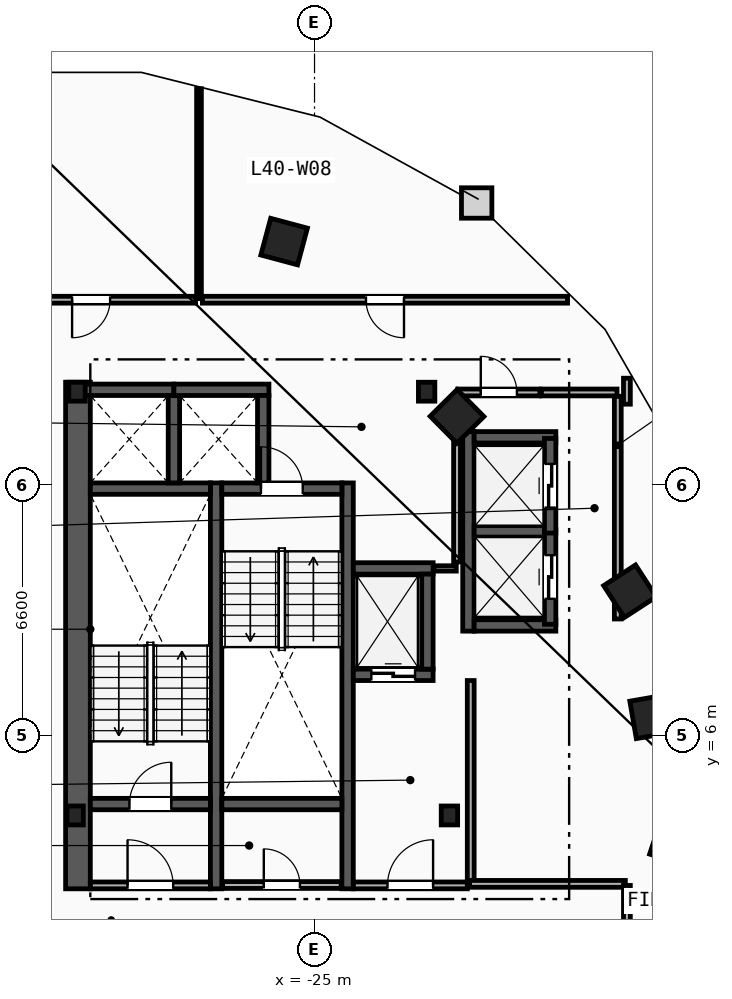
"""IFC4 building model, lengths in metres.
Left out: names, types, materials, properties, quantities, classifications, styles, units other than length and angle.
Written with IfcOpenShell. Run it as: python <this file> out.ifc"""

import sys

from ifc_helpers import new_model, si_unit, direction, frame, frame_2d, origin, origin_2d, place, context, subcontext, project, spatial, rectangle, i_section, extrude, element, fill, save


model = new_model("IFC4")
c1 = context("Model", 3, precision=1e-05, world=origin(), true_north=direction((0.0, 1.0)))
c2 = subcontext(c1, "Body", "Model", "MODEL_VIEW")
j1 = project(units=[si_unit("LENGTHUNIT", "METRE"), si_unit("PLANEANGLEUNIT", "RADIAN")], contexts=[c1])
p1 = place(None, origin())
s1 = spatial("IfcSite", under=j1, at=p1, CompositionType="ELEMENT")
p2 = place(p1, origin())
s2 = spatial("IfcBuilding", under=s1, at=p2, CompositionType="ELEMENT")
p3 = place(p2, frame((0.0, 0.0, 154.8)))
s3 = spatial("IfcBuildingStorey", under=s2, at=p3, CompositionType="ELEMENT", Elevation=154.8)
for number, where, z_axis, x_axis in (
    (1, (-31.3, 3.9, 0.0), (0.0, 0.0, 1.0), (1.0, 0.0, 0.0)),
    (2, (-21.45, 3.9, 0.0), (0.0, 0.0, 1.0), (1.0, 0.0, 0.0)),
    (3, (-22.05, 15.05, 0.0), (0.0, 0.0, 1.0), (1.0, 0.0, 0.0)),
    (4, (-31.25, 15.05, 0.0), (0.0, 0.0, 1.0), (1.0, 0.0, 0.0)),
):
    element("IfcColumn", number, at=place(p3, frame(where, z_axis=z_axis, x_axis=x_axis)), inside=s3, PredefinedType="COLUMN", context=c2, shape_type="SweptSolid", body=[
        extrude(i_section(OverallWidth=0.432, OverallDepth=0.498, WebThickness=0.056, FlangeThickness=0.089, FilletRadius=0.018, at=origin_2d()), origin(), (0.0, 0.0, 1.0), 3.6),
    ])
for number, where, z_axis, x_axis in (
    (5, (-15.55, 3.2, 0.0), (0.0, 0.0, 1.0), (0.315, 0.949, 0.0)),
    (6, (-16.125, 6.5, 0.0), (0.0, 0.0, 1.0), (-0.172, 0.985, 0.0)),
    (7, (-16.7, 9.8, 0.0), (0.0, 0.0, 1.0), (-0.544, 0.839, 0.0)),
    (8, (-21.25, 14.4, 0.0), (0.0, 0.0, 1.0), (-0.703, 0.711, 0.0)),
    (9, (-25.8, 19.0, 0.0), (0.0, 0.0, 1.0), (-0.966, 0.259, 0.0)),
):
    element("IfcColumn", number, at=place(p3, frame(where, z_axis=z_axis, x_axis=x_axis)), inside=s3, PredefinedType="COLUMN", context=c2, shape_type="SweptSolid", body=[
        extrude(rectangle(XDim=1.0, YDim=1.0, at=origin_2d()), origin(), (0.0, 0.0, 1.0), 3.6),
    ])
p4 = place(p3, frame((-31.225, 1.97, 0.0), z_axis=(0.0, 0.0, 1.0), x_axis=(0.0, 1.0, 0.0)))
e10 = element("IfcWall", 10, at=p4, inside=s3, PredefinedType="SHEAR", context=c2, shape_type="SweptSolid", body=[
    extrude(rectangle(XDim=13.33, YDim=0.65, at=frame_2d((6.665, 0.0))), origin(), (0.0, 0.0, 1.0), 3.36),
])
for number, where, z_axis, x_axis in (
    (11, (-27.59, 1.97, 0.0), (0.0, 0.0, 1.0), (0.0, 1.0, 0.0)),
    (12, (-24.13, 1.97, 0.0), (0.0, 0.0, 1.0), (0.0, 1.0, 0.0)),
):
    element("IfcWall", number, at=place(p3, frame(where, z_axis=z_axis, x_axis=x_axis)), inside=s3, PredefinedType="SHEAR", context=c2, shape_type="SweptSolid", body=[
        extrude(rectangle(XDim=10.68, YDim=0.3, at=frame_2d((5.34, 0.0))), origin(), (0.0, 0.0, 1.0), 3.36),
    ])
p5 = place(p3, frame((-30.9, 4.2, 0.0), z_axis=(0.0, 0.0, 1.0), x_axis=(1.0, 0.0, 0.0)))
e13 = element("IfcWall", 13, at=p5, inside=s3, PredefinedType="SHEAR", context=c2, shape_type="SweptSolid", body=[
    extrude(rectangle(XDim=3.16, YDim=0.3, at=frame_2d((1.58, 0.0))), origin(), (0.0, 0.0, 1.0), 3.36),
])
p6 = place(p5, frame((1.03, 0.0, 0.0)))
e14 = element("IfcOpeningElement", 14, at=p6, cuts=e13, PredefinedType="OPENING", context=c2, shape_type="SweptSolid", body=[
    extrude(rectangle(XDim=1.1, YDim=2.15, at=frame_2d((0.55, 1.075))), frame((0.0, 0.16, 0.0), z_axis=(0.0, -1.0, 0.0), x_axis=(1.0, 0.0, 0.0)), (0.0, 0.0, 1.0), 0.32),
])
p7 = place(p3, frame((-30.9, 12.5, 0.0), z_axis=(0.0, 0.0, 1.0), x_axis=(1.0, 0.0, 0.0)))
e15 = element("IfcWall", 15, at=p7, inside=s3, PredefinedType="SHEAR", context=c2, shape_type="SweptSolid", body=[
    extrude(rectangle(XDim=3.16, YDim=0.3, at=frame_2d((1.58, 0.0))), origin(), (0.0, 0.0, 1.0), 3.36),
])
p8 = place(p3, frame((-27.44, 12.5, 0.0), z_axis=(0.0, 0.0, 1.0), x_axis=(1.0, 0.0, 0.0)))
e16 = element("IfcWall", 16, at=p8, inside=s3, PredefinedType="SHEAR", context=c2, shape_type="SweptSolid", body=[
    extrude(rectangle(XDim=3.16, YDim=0.3, at=frame_2d((1.58, 0.0))), origin(), (0.0, 0.0, 1.0), 3.36),
])
p9 = place(p8, frame((1.03, 0.0, 0.0)))
e17 = element("IfcOpeningElement", 17, at=p9, cuts=e16, PredefinedType="OPENING", context=c2, shape_type="SweptSolid", body=[
    extrude(rectangle(XDim=1.1, YDim=2.15, at=frame_2d((0.55, 1.075))), frame((0.0, 0.16, 0.0), z_axis=(0.0, -1.0, 0.0), x_axis=(1.0, 0.0, 0.0)), (0.0, 0.0, 1.0), 0.32),
])
p10 = place(p3, frame((-27.44, 4.2, 0.0), z_axis=(0.0, 0.0, 1.0), x_axis=(1.0, 0.0, 0.0)))
e18 = element("IfcWall", 18, at=p10, inside=s3, PredefinedType="SHEAR", context=c2, shape_type="SweptSolid", body=[
    extrude(rectangle(XDim=3.16, YDim=0.3, at=frame_2d((1.58, 0.0))), origin(), (0.0, 0.0, 1.0), 3.36),
])
p11 = place(p3, frame((-20.89, 2.15, 0.0), z_axis=(0.0, 0.0, 1.0), x_axis=(0.0, 1.0, 0.0)))
e19 = element("IfcWall", 19, at=p11, inside=s3, PredefinedType="PARTITIONING", context=c2, shape_type="SweptSolid", body=[
    extrude(rectangle(XDim=5.3, YDim=0.18, at=frame_2d((2.65, 0.0))), origin(), (0.0, 0.0, 1.0), 3.36),
])
p12 = place(p3, frame((-23.98, 2.06, 0.0), z_axis=(0.0, 0.0, 1.0), x_axis=(1.0, 0.0, 0.0)))
e20 = element("IfcWall", 20, at=p12, inside=s3, PredefinedType="PARTITIONING", context=c2, shape_type="SweptSolid", body=[
    extrude(rectangle(XDim=3.0, YDim=0.18, at=frame_2d((1.5, 0.0))), origin(), (0.0, 0.0, 1.0), 3.36),
])
p13 = place(p12, frame((0.9, 0.0, 0.0)))
e21 = element("IfcOpeningElement", 21, at=p13, cuts=e20, PredefinedType="OPENING", context=c2, shape_type="SweptSolid", body=[
    extrude(rectangle(XDim=1.2, YDim=2.15, at=frame_2d((0.6, 1.075))), frame((0.0, 0.1, 0.0), z_axis=(0.0, -1.0, 0.0), x_axis=(1.0, 0.0, 0.0)), (0.0, 0.0, 1.0), 0.2),
])
p14 = place(p3, frame((-30.9, 2.06, 0.0), z_axis=(0.0, 0.0, 1.0), x_axis=(1.0, 0.0, 0.0)))
e22 = element("IfcWall", 22, at=p14, inside=s3, PredefinedType="PARTITIONING", context=c2, shape_type="SweptSolid", body=[
    extrude(rectangle(XDim=3.16, YDim=0.18, at=frame_2d((1.58, 0.0))), origin(), (0.0, 0.0, 1.0), 3.36),
])
p15 = place(p14, frame((0.98, 0.0, 0.0)))
e23 = element("IfcOpeningElement", 23, at=p15, cuts=e22, PredefinedType="OPENING", context=c2, shape_type="SweptSolid", body=[
    extrude(rectangle(XDim=1.2, YDim=2.15, at=frame_2d((0.6, 1.075))), frame((0.0, 0.1, 0.0), z_axis=(0.0, -1.0, 0.0), x_axis=(1.0, 0.0, 0.0)), (0.0, 0.0, 1.0), 0.2),
])
p16 = place(p3, frame((-23.98, 7.6, 0.0), z_axis=(0.0, 0.0, 1.0), x_axis=(1.0, 0.0, 0.0)))
e24 = element("IfcWall", 24, at=p16, inside=s3, PredefinedType="SHEAR", context=c2, shape_type="SweptSolid", body=[
    extrude(rectangle(XDim=2.1, YDim=0.3, at=frame_2d((1.05, 0.0))), origin(), (0.0, 0.0, 1.0), 3.36),
])
p17 = place(p16, frame((0.475, 0.0, 0.0)))
e25 = element("IfcOpeningElement", 25, at=p17, cuts=e24, PredefinedType="OPENING", context=c2, shape_type="SweptSolid", body=[
    extrude(rectangle(XDim=1.15, YDim=2.2, at=frame_2d((0.575, 1.1))), frame((0.0, 0.16, 0.0), z_axis=(0.0, -1.0, 0.0), x_axis=(1.0, 0.0, 0.0)), (0.0, 0.0, 1.0), 0.32),
])
p18 = place(p3, frame((-23.98, 10.4, 0.0), z_axis=(0.0, 0.0, 1.0), x_axis=(1.0, 0.0, 0.0)))
e26 = element("IfcWall", 26, at=p18, inside=s3, PredefinedType="SHEAR", context=c2, shape_type="SweptSolid", body=[
    extrude(rectangle(XDim=2.1, YDim=0.3, at=frame_2d((1.05, 0.0))), origin(), (0.0, 0.0, 1.0), 3.36),
])
for number, where, z_axis, x_axis in (
    (27, (-22.03, 7.75, 0.0), (0.0, 0.0, 1.0), (0.0, 1.0, 0.0)),
    (28, (-31.2, 15.1, 0.0), (0.0, 0.0, 1.0), (1.0, 0.0, 0.0)),
):
    element("IfcWall", number, at=place(p3, frame(where, z_axis=z_axis, x_axis=x_axis)), inside=s3, PredefinedType="SHEAR", context=c2, shape_type="SweptSolid", body=[
        extrude(rectangle(XDim=2.5, YDim=0.3, at=frame_2d((1.25, 0.0))), origin(), (0.0, 0.0, 1.0), 3.36),
    ])
p19 = place(p3, frame((-28.7, 12.65, 0.0), z_axis=(0.0, 0.0, 1.0), x_axis=(0.0, 1.0, 0.0)))
e29 = element("IfcWall", 29, at=p19, inside=s3, PredefinedType="SHEAR", context=c2, shape_type="SweptSolid", body=[
    extrude(rectangle(XDim=2.3, YDim=0.3, at=frame_2d((1.15, 0.0))), origin(), (0.0, 0.0, 1.0), 3.36),
])
p20 = place(p3, frame((-28.7, 15.1, 0.0), z_axis=(0.0, 0.0, 1.0), x_axis=(1.0, 0.0, 0.0)))
e30 = element("IfcWall", 30, at=p20, inside=s3, PredefinedType="SHEAR", context=c2, shape_type="SweptSolid", body=[
    extrude(rectangle(XDim=2.5, YDim=0.3, at=frame_2d((1.25, 0.0))), origin(), (0.0, 0.0, 1.0), 3.36),
])
p21 = place(p3, frame((-26.35, 12.65, 0.0), z_axis=(0.0, 0.0, 1.0), x_axis=(0.0, 1.0, 0.0)))
e31 = element("IfcWall", 31, at=p21, inside=s3, PredefinedType="SHEAR", context=c2, shape_type="SweptSolid", body=[
    extrude(rectangle(XDim=2.3, YDim=0.3, at=frame_2d((1.15, 0.0))), origin(), (0.0, 0.0, 1.0), 3.36),
])
p22 = place(p3, frame((-20.95, 8.75, 0.0), z_axis=(0.0, 0.0, 1.0), x_axis=(0.0, 1.0, 0.0)))
e32 = element("IfcWall", 32, at=p22, inside=s3, PredefinedType="SHEAR", context=c2, shape_type="SweptSolid", body=[
    extrude(rectangle(XDim=5.25, YDim=0.3, at=frame_2d((2.625, 0.0))), origin(), (0.0, 0.0, 1.0), 3.36),
])
for number, where, z_axis, x_axis in (
    (33, (-20.8, 8.9, 0.0), (0.0, 0.0, 1.0), (1.0, 0.0, 0.0)),
    (34, (-20.8, 13.85, 0.0), (0.0, 0.0, 1.0), (1.0, 0.0, 0.0)),
):
    element("IfcWall", number, at=place(p3, frame(where, z_axis=z_axis, x_axis=x_axis)), inside=s3, PredefinedType="SHEAR", context=c2, shape_type="SweptSolid", body=[
        extrude(rectangle(XDim=2.15, YDim=0.3, at=frame_2d((1.075, 0.0))), origin(), (0.0, 0.0, 1.0), 3.36),
    ])
p23 = place(p3, frame((-20.8, 11.375, 0.0), z_axis=(0.0, 0.0, 1.0), x_axis=(1.0, 0.0, 0.0)))
e35 = element("IfcWall", 35, at=p23, inside=s3, PredefinedType="SHEAR", context=c2, shape_type="SweptSolid", body=[
    extrude(rectangle(XDim=1.85, YDim=0.3, at=frame_2d((0.925, 0.0))), origin(), (0.0, 0.0, 1.0), 3.36),
])
p24 = place(p3, frame((-18.8, 8.93, 0.0), z_axis=(0.0, 0.0, 1.0), x_axis=(0.0, 1.0, 0.0)))
e36 = element("IfcWall", 36, at=p24, inside=s3, PredefinedType="SHEAR", context=c2, shape_type="SweptSolid", body=[
    extrude(rectangle(XDim=2.49, YDim=0.3, at=frame_2d((1.245, 0.0))), origin(), (0.0, 0.0, 1.0), 3.36),
])
p25 = place(p24, frame((0.67, 0.0, 0.0)))
e37 = element("IfcOpeningElement", 37, at=p25, cuts=e36, PredefinedType="OPENING", context=c2, shape_type="SweptSolid", body=[
    extrude(rectangle(XDim=1.15, YDim=2.2, at=frame_2d((0.575, 1.1))), frame((0.0, 0.16, 0.0), z_axis=(0.0, -1.0, 0.0), x_axis=(1.0, 0.0, 0.0)), (0.0, 0.0, 1.0), 0.32),
])
p26 = place(p3, frame((-18.8, 11.33, 0.0), z_axis=(0.0, 0.0, 1.0), x_axis=(0.0, 1.0, 0.0)))
e38 = element("IfcWall", 38, at=p26, inside=s3, PredefinedType="SHEAR", context=c2, shape_type="SweptSolid", body=[
    extrude(rectangle(XDim=2.49, YDim=0.3, at=frame_2d((1.245, 0.0))), origin(), (0.0, 0.0, 1.0), 3.36),
])
p27 = place(p26, frame((0.67, 0.0, 0.0)))
e39 = element("IfcOpeningElement", 39, at=p27, cuts=e38, PredefinedType="OPENING", context=c2, shape_type="SweptSolid", body=[
    extrude(rectangle(XDim=1.15, YDim=2.2, at=frame_2d((0.575, 1.1))), frame((0.0, 0.16, 0.0), z_axis=(0.0, -1.0, 0.0), x_axis=(1.0, 0.0, 0.0)), (0.0, 0.0, 1.0), 0.32),
])
p28 = place(p3, frame((-17.02, 9.07, 0.0), z_axis=(0.0, 0.0, 1.0), x_axis=(0.0, 1.0, 0.0)))
e40 = element("IfcWall", 40, at=p28, inside=s3, PredefinedType="PARTITIONING", context=c2, shape_type="SweptSolid", body=[
    extrude(rectangle(XDim=5.86, YDim=0.18, at=frame_2d((2.93, 0.0))), origin(), (0.0, 0.0, 1.0), 3.36),
])
p29 = place(p3, frame((-21.23, 15.03, 0.0), z_axis=(0.0, 0.0, 1.0), x_axis=(1.0, 0.0, 0.0)))
e41 = element("IfcWall", 41, at=p29, inside=s3, PredefinedType="PARTITIONING", context=c2, shape_type="SweptSolid", body=[
    extrude(rectangle(XDim=2.16, YDim=0.18, at=frame_2d((1.08, 0.0))), origin(), (0.0, 0.0, 1.0), 3.36),
])
p30 = place(p29, frame((0.605, 0.0, 0.0)))
e42 = element("IfcOpeningElement", 42, at=p30, cuts=e41, PredefinedType="OPENING", context=c2, shape_type="SweptSolid", body=[
    extrude(rectangle(XDim=0.95, YDim=2.1, at=frame_2d((0.475, 1.05))), frame((0.0, 0.1, 0.0), z_axis=(0.0, -1.0, 0.0), x_axis=(1.0, 0.0, 0.0)), (0.0, 0.0, 1.0), 0.2),
])
p31 = place(p3, frame((-19.03, 15.03, 0.0), z_axis=(0.0, 0.0, 1.0), x_axis=(1.0, 0.0, 0.0)))
e43 = element("IfcWall", 43, at=p31, inside=s3, PredefinedType="PARTITIONING", context=c2, shape_type="SweptSolid", body=[
    extrude(rectangle(XDim=1.99, YDim=0.18, at=frame_2d((0.995, 0.0))), origin(), (0.0, 0.0, 1.0), 3.36),
])
p32 = place(p3, frame((-21.86, 10.4, 0.0), z_axis=(0.0, 0.0, 1.0), x_axis=(1.0, 0.0, 0.0)))
e44 = element("IfcWall", 44, at=p32, inside=s3, PredefinedType="PARTITIONING", context=c2, shape_type="SweptSolid", body=[
    extrude(rectangle(XDim=0.59, YDim=0.14, at=frame_2d((0.295, 0.0))), origin(), (0.0, 0.0, 1.0), 3.36),
])
p33 = place(p3, frame((-21.25, 10.57, 0.0), z_axis=(0.0, 0.0, 1.0), x_axis=(0.0, 1.0, 0.0)))
e45 = element("IfcWall", 45, at=p33, inside=s3, PredefinedType="PARTITIONING", context=c2, shape_type="SweptSolid", body=[
    extrude(rectangle(XDim=4.36, YDim=0.18, at=frame_2d((2.18, 0.0))), origin(), (0.0, 0.0, 1.0), 3.36),
])
p34 = place(p3, frame((-27.42, 2.07, 0.0), z_axis=(0.0, 0.0, 1.0), x_axis=(1.0, 0.0, 0.0)))
e46 = element("IfcWall", 46, at=p34, inside=s3, PredefinedType="PARTITIONING", context=c2, shape_type="SweptSolid", body=[
    extrude(rectangle(XDim=3.12, YDim=0.18, at=frame_2d((1.56, 0.0))), origin(), (0.0, 0.0, 1.0), 3.36),
])
p35 = place(p34, frame((1.085, 0.0, 0.0)))
e47 = element("IfcOpeningElement", 47, at=p35, cuts=e46, PredefinedType="OPENING", context=c2, shape_type="SweptSolid", body=[
    extrude(rectangle(XDim=0.95, YDim=2.1, at=frame_2d((0.475, 1.05))), frame((0.0, 0.1, 0.0), z_axis=(0.0, -1.0, 0.0), x_axis=(1.0, 0.0, 0.0)), (0.0, 0.0, 1.0), 0.2),
])
p36 = place(p3, frame((-28.04, 17.5, 0.0), z_axis=(0.0, 0.0, 1.0), x_axis=(0.0, 1.0, 0.0)))
e48 = element("IfcWall", 48, at=p36, inside=s3, PredefinedType="PARTITIONING", context=c2, shape_type="SweptSolid", body=[
    extrude(rectangle(XDim=5.521, YDim=0.125, at=frame_2d((2.761, 0.0))), origin(), (0.0, 0.0, 1.0), 3.36),
])
p37 = place(p3, frame((-16.822, 2.1, 0.0), z_axis=(0.0, 0.0, 1.0), x_axis=(-1.0, 0.0, 0.0)))
e49 = element("IfcWall", 49, at=p37, inside=s3, PredefinedType="PARTITIONING", context=c2, shape_type="SweptSolid", body=[
    extrude(rectangle(XDim=4.098, YDim=0.18, at=frame_2d((2.049, 0.0))), origin(), (0.0, 0.0, 1.0), 3.36),
])
p38 = place(p3, frame((-16.78, -0.329, 0.0), z_axis=(0.0, 0.0, 1.0), x_axis=(0.0, 1.0, 0.0)))
e50 = element("IfcWall", 50, at=p38, inside=s3, PredefinedType="PARTITIONING", context=c2, shape_type="SweptSolid", body=[
    extrude(rectangle(XDim=2.387, YDim=0.18, at=frame_2d((1.194, 0.0))), origin(), (0.0, 0.0, 1.0), 3.36),
])
p39 = place(p3, frame((-16.78, 14.721, 0.0), z_axis=(0.0, 0.0, 1.0), x_axis=(0.0, 1.0, 0.0)))
e51 = element("IfcWall", 51, at=p39, inside=s3, PredefinedType="PARTITIONING", context=c2, shape_type="SweptSolid", body=[
    extrude(rectangle(XDim=0.684, YDim=0.18, at=frame_2d((0.342, 0.0))), origin(), (0.0, 0.0, 1.0), 3.36),
])
p40 = place(p3, frame((-28.13, 17.47, 0.0), z_axis=(0.0, 0.0, 1.0), x_axis=(-1.0, 0.0, 0.0)))
e52 = element("IfcWall", 52, at=p40, inside=s3, PredefinedType="PARTITIONING", context=c2, shape_type="SweptSolid", body=[
    extrude(rectangle(XDim=5.499, YDim=0.18, at=frame_2d((2.749, 0.0))), origin(), (0.0, 0.0, 1.0), 3.36),
])
p41 = place(p40, frame((2.249, 0.0, 0.0)))
e53 = element("IfcOpeningElement", 53, at=p41, cuts=e52, PredefinedType="OPENING", context=c2, shape_type="SweptSolid", body=[
    extrude(rectangle(XDim=1.0, YDim=2.15, at=frame_2d((0.5, 1.075))), frame((0.0, 0.1, 0.0), z_axis=(0.0, -1.0, 0.0), x_axis=(1.0, 0.0, 0.0)), (0.0, 0.0, 1.0), 0.2),
])
p42 = place(p3, frame((-18.342, 17.47, 0.0), z_axis=(0.0, 0.0, 1.0), x_axis=(-1.0, 0.0, 0.0)))
e54 = element("IfcWall", 54, at=p42, inside=s3, PredefinedType="PARTITIONING", context=c2, shape_type="SweptSolid", body=[
    extrude(rectangle(XDim=9.608, YDim=0.18, at=frame_2d((4.804, 0.0))), origin(), (0.0, 0.0, 1.0), 3.36),
])
p43 = place(p42, frame((4.304, 0.0, 0.0)))
e55 = element("IfcOpeningElement", 55, at=p43, cuts=e54, PredefinedType="OPENING", context=c2, shape_type="SweptSolid", body=[
    extrude(rectangle(XDim=1.0, YDim=2.15, at=frame_2d((0.5, 1.075))), frame((0.0, 0.1, 0.0), z_axis=(0.0, -1.0, 0.0), x_axis=(1.0, 0.0, 0.0)), (0.0, 0.0, 1.0), 0.2),
])
p44 = place(p6, origin())
e56 = element("IfcDoor", 56, at=p44, inside=s3, OperationType="SINGLE_SWING_RIGHT", PredefinedType="DOOR", context=c2, shape_type="SweptSolid", body=[
    extrude(rectangle(XDim=1.1, YDim=2.15, at=frame_2d((0.55, 1.075))), frame((0.0, 0.025, 0.0), z_axis=(0.0, -1.0, 0.0), x_axis=(1.0, 0.0, 0.0)), (0.0, 0.0, 1.0), 0.05),
])
fill(e14, e56)
p45 = place(p9, origin())
e57 = element("IfcDoor", 57, at=p45, inside=s3, OperationType="SINGLE_SWING_LEFT", PredefinedType="DOOR", context=c2, shape_type="SweptSolid", body=[
    extrude(rectangle(XDim=1.1, YDim=2.15, at=frame_2d((0.55, 1.075))), frame((0.0, 0.025, 0.0), z_axis=(0.0, -1.0, 0.0), x_axis=(1.0, 0.0, 0.0)), (0.0, 0.0, 1.0), 0.05),
])
fill(e17, e57)
p46 = place(p13, origin())
e58 = element("IfcDoor", 58, at=p46, inside=s3, OperationType="SINGLE_SWING_RIGHT", PredefinedType="DOOR", context=c2, shape_type="SweptSolid", body=[
    extrude(rectangle(XDim=1.2, YDim=2.15, at=frame_2d((0.6, 1.075))), frame((0.0, 0.025, 0.0), z_axis=(0.0, -1.0, 0.0), x_axis=(1.0, 0.0, 0.0)), (0.0, 0.0, 1.0), 0.05),
])
fill(e21, e58)
p47 = place(p15, origin())
e59 = element("IfcDoor", 59, at=p47, inside=s3, OperationType="SINGLE_SWING_LEFT", PredefinedType="DOOR", context=c2, shape_type="SweptSolid", body=[
    extrude(rectangle(XDim=1.2, YDim=2.15, at=frame_2d((0.6, 1.075))), frame((0.0, 0.025, 0.0), z_axis=(0.0, -1.0, 0.0), x_axis=(1.0, 0.0, 0.0)), (0.0, 0.0, 1.0), 0.05),
])
fill(e23, e59)
p48 = place(p17, origin())
e60 = element("IfcDoor", 60, at=p48, inside=s3, OperationType="SLIDING_TO_LEFT", PredefinedType="TRAPDOOR", context=c2, shape_type="SweptSolid", body=[
    extrude(rectangle(XDim=1.15, YDim=2.2, at=frame_2d((0.575, 1.1))), frame((0.0, 0.025, 0.0), z_axis=(0.0, -1.0, 0.0), x_axis=(1.0, 0.0, 0.0)), (0.0, 0.0, 1.0), 0.05),
])
fill(e25, e60)
p49 = place(p25, origin())
e61 = element("IfcDoor", 61, at=p49, inside=s3, OperationType="SLIDING_TO_LEFT", PredefinedType="TRAPDOOR", context=c2, shape_type="SweptSolid", body=[
    extrude(rectangle(XDim=1.15, YDim=2.2, at=frame_2d((0.575, 1.1))), frame((0.0, 0.025, 0.0), z_axis=(0.0, -1.0, 0.0), x_axis=(1.0, 0.0, 0.0)), (0.0, 0.0, 1.0), 0.05),
])
fill(e37, e61)
p50 = place(p27, origin())
e62 = element("IfcDoor", 62, at=p50, inside=s3, OperationType="SLIDING_TO_LEFT", PredefinedType="TRAPDOOR", context=c2, shape_type="SweptSolid", body=[
    extrude(rectangle(XDim=1.15, YDim=2.2, at=frame_2d((0.575, 1.1))), frame((0.0, 0.025, 0.0), z_axis=(0.0, -1.0, 0.0), x_axis=(1.0, 0.0, 0.0)), (0.0, 0.0, 1.0), 0.05),
])
fill(e39, e62)
p51 = place(p43, origin())
e63 = element("IfcDoor", 63, at=p51, inside=s3, OperationType="SINGLE_SWING_LEFT", PredefinedType="DOOR", context=c2, shape_type="SweptSolid", body=[
    extrude(rectangle(XDim=1.0, YDim=2.15, at=frame_2d((0.5, 1.075))), frame((0.0, 0.025, 0.0), z_axis=(0.0, -1.0, 0.0), x_axis=(1.0, 0.0, 0.0)), (0.0, 0.0, 1.0), 0.05),
])
fill(e55, e63)
p52 = place(p41, origin())
e64 = element("IfcDoor", 64, at=p52, inside=s3, OperationType="SINGLE_SWING_RIGHT", PredefinedType="DOOR", context=c2, shape_type="SweptSolid", body=[
    extrude(rectangle(XDim=1.0, YDim=2.15, at=frame_2d((0.5, 1.075))), frame((0.0, 0.025, 0.0), z_axis=(0.0, -1.0, 0.0), x_axis=(1.0, 0.0, 0.0)), (0.0, 0.0, 1.0), 0.05),
])
fill(e53, e64)
p53 = place(p35, origin())
e65 = element("IfcDoor", 65, at=p53, inside=s3, OperationType="SINGLE_SWING_LEFT", PredefinedType="DOOR", context=c2, shape_type="SweptSolid", body=[
    extrude(rectangle(XDim=0.95, YDim=2.1, at=frame_2d((0.475, 1.05))), frame((0.0, 0.025, 0.0), z_axis=(0.0, -1.0, 0.0), x_axis=(1.0, 0.0, 0.0)), (0.0, 0.0, 1.0), 0.05),
])
fill(e47, e65)
p54 = place(p30, origin())
e66 = element("IfcDoor", 66, at=p54, inside=s3, OperationType="SINGLE_SWING_LEFT", PredefinedType="DOOR", context=c2, shape_type="SweptSolid", body=[
    extrude(rectangle(XDim=0.95, YDim=2.1, at=frame_2d((0.475, 1.05))), frame((0.0, 0.025, 0.0), z_axis=(0.0, -1.0, 0.0), x_axis=(1.0, 0.0, 0.0)), (0.0, 0.0, 1.0), 0.05),
])
fill(e42, e66)
save(model, sys.argv[1])
